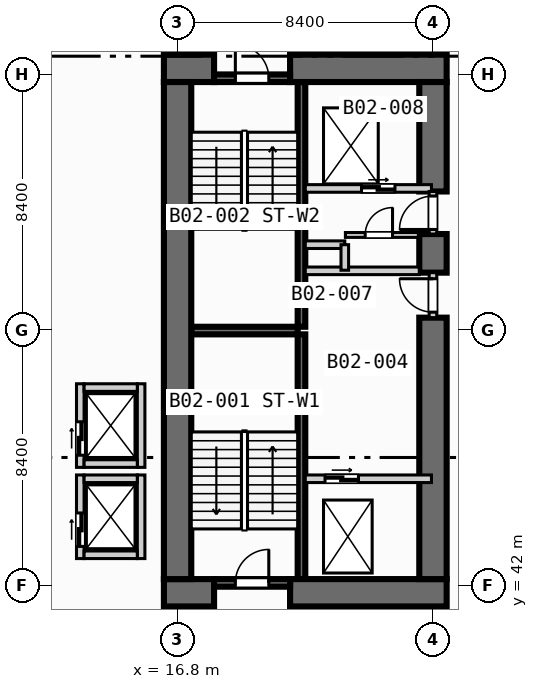
"""IFC4 building model, lengths in metres.
Left out: names, types, materials, properties, quantities, classifications, styles, units other than length and angle.
Written with IfcOpenShell. Run it as: python <this file> out.ifc"""

import sys

from ifc_helpers import new_model, si_unit, direction, frame, frame_2d, origin, place, context, subcontext, project, spatial, rectangle, extrude, element, fill, save


model = new_model("IFC4")
c1 = context("Model", 3, precision=1e-05, world=origin(), true_north=direction((0.0, 1.0)))
c2 = subcontext(c1, "Body", "Model", "MODEL_VIEW")
j1 = project(units=[si_unit("LENGTHUNIT", "METRE"), si_unit("PLANEANGLEUNIT", "RADIAN")], contexts=[c1])
p1 = place(None, origin())
s1 = spatial("IfcSite", under=j1, at=p1, CompositionType="ELEMENT")
p2 = place(p1, origin())
s2 = spatial("IfcBuilding", under=s1, at=p2, CompositionType="ELEMENT")
p3 = place(p2, frame((0.0, 0.0, -8.4)))
s3 = spatial("IfcBuildingStorey", under=s2, at=p3, CompositionType="ELEMENT", Elevation=-8.4)
for number, where, z_axis, x_axis in (
    (1, (20.875, 42.2, 0.0), (0.0, 0.0, 1.0), (0.0, 1.0, 0.0)),
    (2, (20.875, 50.5, 0.0), (0.0, 0.0, 1.0), (0.0, 1.0, 0.0)),
):
    element("IfcWall", number, at=place(p3, frame(where, z_axis=z_axis, x_axis=x_axis)), inside=s3, PredefinedType="SOLIDWALL", context=c2, shape_type="SweptSolid", body=[
        extrude(rectangle(XDim=8.05, YDim=0.25, at=frame_2d((4.025, 0.0))), origin(), (0.0, 0.0, 1.0), 3.85),
    ])
p4 = place(p3, frame((17.25, 50.375, 0.0), z_axis=(0.0, 0.0, 1.0), x_axis=(1.0, 0.0, 0.0)))
e3 = element("IfcWall", 3, at=p4, inside=s3, PredefinedType="SOLIDWALL", context=c2, shape_type="SweptSolid", body=[
    extrude(rectangle(XDim=3.5, YDim=0.25, at=frame_2d((1.75, 0.0))), origin(), (0.0, 0.0, 1.0), 3.85),
])
p5 = place(p3, frame((16.35, 41.75, 0.0), z_axis=(0.0, 0.0, 1.0), x_axis=(1.0, 0.0, 0.0)))
e4 = element("IfcWall", 4, at=p5, inside=s3, PredefinedType="SHEAR", context=c2, shape_type="SweptSolid", body=[
    extrude(rectangle(XDim=1.65, YDim=0.9, at=frame_2d((0.825, 0.0))), origin(), (0.0, 0.0, 1.0), 3.85),
])
p6 = place(p3, frame((20.5, 41.75, 0.0), z_axis=(0.0, 0.0, 1.0), x_axis=(1.0, 0.0, 0.0)))
e5 = element("IfcWall", 5, at=p6, inside=s3, PredefinedType="SHEAR", context=c2, shape_type="SweptSolid", body=[
    extrude(rectangle(XDim=5.15, YDim=0.9, at=frame_2d((2.575, 0.0))), origin(), (0.0, 0.0, 1.0), 3.85),
])
p7 = place(p3, frame((16.35, 59.0, 0.0), z_axis=(0.0, 0.0, 1.0), x_axis=(1.0, 0.0, 0.0)))
e6 = element("IfcWall", 6, at=p7, inside=s3, PredefinedType="SHEAR", context=c2, shape_type="SweptSolid", body=[
    extrude(rectangle(XDim=1.65, YDim=0.9, at=frame_2d((0.825, 0.0))), origin(), (0.0, 0.0, 1.0), 3.85),
])
p8 = place(p3, frame((20.5, 59.0, 0.0), z_axis=(0.0, 0.0, 1.0), x_axis=(1.0, 0.0, 0.0)))
e7 = element("IfcWall", 7, at=p8, inside=s3, PredefinedType="SHEAR", context=c2, shape_type="SweptSolid", body=[
    extrude(rectangle(XDim=5.15, YDim=0.9, at=frame_2d((2.575, 0.0))), origin(), (0.0, 0.0, 1.0), 3.85),
])
p9 = place(p3, frame((16.8, 42.2, 0.0), z_axis=(0.0, 0.0, 1.0), x_axis=(0.0, 1.0, 0.0)))
e8 = element("IfcWall", 8, at=p9, inside=s3, PredefinedType="SHEAR", context=c2, shape_type="SweptSolid", body=[
    extrude(rectangle(XDim=16.35, YDim=0.9, at=frame_2d((8.175, 0.0))), origin(), (0.0, 0.0, 1.0), 3.85),
])
p10 = place(p3, frame((25.2, 42.2, 0.0), z_axis=(0.0, 0.0, 1.0), x_axis=(0.0, 1.0, 0.0)))
e9 = element("IfcWall", 9, at=p10, inside=s3, PredefinedType="SHEAR", context=c2, shape_type="SweptSolid", body=[
    extrude(rectangle(XDim=8.6, YDim=0.9, at=frame_2d((4.3, 0.0))), origin(), (0.0, 0.0, 1.0), 3.85),
])
p11 = place(p3, frame((25.2, 52.28, 0.0), z_axis=(0.0, 0.0, 1.0), x_axis=(0.0, 1.0, 0.0)))
e10 = element("IfcWall", 10, at=p11, inside=s3, PredefinedType="SHEAR", context=c2, shape_type="SweptSolid", body=[
    extrude(rectangle(XDim=1.27, YDim=0.9, at=frame_2d((0.635, 0.0))), origin(), (0.0, 0.0, 1.0), 3.85),
])
p12 = place(p3, frame((25.2, 54.95, 0.0), z_axis=(0.0, 0.0, 1.0), x_axis=(0.0, 1.0, 0.0)))
e11 = element("IfcWall", 11, at=p12, inside=s3, PredefinedType="SHEAR", context=c2, shape_type="SweptSolid", body=[
    extrude(rectangle(XDim=3.6, YDim=0.9, at=frame_2d((1.8, 0.0))), origin(), (0.0, 0.0, 1.0), 3.85),
])
p13 = place(p3, frame((18.0, 42.075, 0.0), z_axis=(0.0, 0.0, 1.0), x_axis=(1.0, 0.0, 0.0)))
e12 = element("IfcWall", 12, at=p13, inside=s3, PredefinedType="SOLIDWALL", context=c2, shape_type="SweptSolid", body=[
    extrude(rectangle(XDim=2.5, YDim=0.25, at=frame_2d((1.25, 0.0))), origin(), (0.0, 0.0, 1.0), 3.85),
])
p14 = place(p13, frame((0.7, 0.0, 0.0)))
e13 = element("IfcOpeningElement", 13, at=p14, cuts=e12, PredefinedType="OPENING", context=c2, shape_type="SweptSolid", body=[
    extrude(rectangle(XDim=1.1, YDim=2.15, at=frame_2d((0.55, 1.075))), frame((0.0, 0.135, 0.0), z_axis=(0.0, -1.0, 0.0), x_axis=(1.0, 0.0, 0.0)), (0.0, 0.0, 1.0), 0.27),
])
p15 = place(p3, frame((18.0, 58.675, 0.0), z_axis=(0.0, 0.0, 1.0), x_axis=(1.0, 0.0, 0.0)))
e14 = element("IfcWall", 14, at=p15, inside=s3, PredefinedType="SOLIDWALL", context=c2, shape_type="SweptSolid", body=[
    extrude(rectangle(XDim=2.5, YDim=0.25, at=frame_2d((1.25, 0.0))), origin(), (0.0, 0.0, 1.0), 3.85),
])
p16 = place(p15, frame((0.7, 0.0, 0.0)))
e15 = element("IfcOpeningElement", 15, at=p16, cuts=e14, PredefinedType="OPENING", context=c2, shape_type="SweptSolid", body=[
    extrude(rectangle(XDim=1.1, YDim=2.15, at=frame_2d((0.55, 1.075))), frame((0.0, 0.135, 0.0), z_axis=(0.0, -1.0, 0.0), x_axis=(1.0, 0.0, 0.0)), (0.0, 0.0, 1.0), 0.27),
])
p17 = place(p3, frame((21.0, 45.5, 0.0), z_axis=(0.0, 0.0, 1.0), x_axis=(1.0, 0.0, 0.0)))
e16 = element("IfcWall", 16, at=p17, inside=s3, PredefinedType="SOLIDWALL", context=c2, shape_type="SweptSolid", body=[
    extrude(rectangle(XDim=4.15, YDim=0.25, at=frame_2d((2.075, 0.0))), origin(), (0.0, 0.0, 1.0), 3.85),
])
p18 = place(p17, frame((0.65, 0.0, 0.0)))
e17 = element("IfcOpeningElement", 17, at=p18, cuts=e16, PredefinedType="OPENING", context=c2, shape_type="SweptSolid", body=[
    extrude(rectangle(XDim=1.1, YDim=2.15, at=frame_2d((0.55, 1.075))), frame((0.0, 0.135, 0.0), z_axis=(0.0, -1.0, 0.0), x_axis=(1.0, 0.0, 0.0)), (0.0, 0.0, 1.0), 0.27),
])
p19 = place(p3, frame((25.2, 50.8, 0.0), z_axis=(0.0, 0.0, 1.0), x_axis=(0.0, 1.0, 0.0)))
e18 = element("IfcWall", 18, at=p19, inside=s3, PredefinedType="SOLIDWALL", context=c2, shape_type="SweptSolid", body=[
    extrude(rectangle(XDim=1.48, YDim=0.25, at=frame_2d((0.74, 0.0))), origin(), (0.0, 0.0, 1.0), 3.85),
])
p20 = place(p19, frame((0.18, 0.0, 0.0)))
e19 = element("IfcOpeningElement", 19, at=p20, cuts=e18, PredefinedType="OPENING", context=c2, shape_type="SweptSolid", body=[
    extrude(rectangle(XDim=1.1, YDim=2.15, at=frame_2d((0.55, 1.075))), frame((0.0, 0.135, 0.0), z_axis=(0.0, -1.0, 0.0), x_axis=(1.0, 0.0, 0.0)), (0.0, 0.0, 1.0), 0.27),
])
p21 = place(p3, frame((21.0, 52.34, 0.0), z_axis=(0.0, 0.0, 1.0), x_axis=(1.0, 0.0, 0.0)))
e20 = element("IfcWall", 20, at=p21, inside=s3, PredefinedType="SOLIDWALL", context=c2, shape_type="SweptSolid", body=[
    extrude(rectangle(XDim=3.75, YDim=0.25, at=frame_2d((1.875, 0.0))), origin(), (0.0, 0.0, 1.0), 3.85),
])
p22 = place(p3, frame((21.0, 55.05, 0.0), z_axis=(0.0, 0.0, 1.0), x_axis=(1.0, 0.0, 0.0)))
e21 = element("IfcWall", 21, at=p22, inside=s3, PredefinedType="SOLIDWALL", context=c2, shape_type="SweptSolid", body=[
    extrude(rectangle(XDim=4.15, YDim=0.25, at=frame_2d((2.075, 0.0))), origin(), (0.0, 0.0, 1.0), 3.85),
])
p23 = place(p22, frame((1.85, 0.0, 0.0)))
e22 = element("IfcOpeningElement", 22, at=p23, cuts=e21, PredefinedType="OPENING", context=c2, shape_type="SweptSolid", body=[
    extrude(rectangle(XDim=1.1, YDim=2.15, at=frame_2d((0.55, 1.075))), frame((0.0, 0.135, 0.0), z_axis=(0.0, -1.0, 0.0), x_axis=(1.0, 0.0, 0.0)), (0.0, 0.0, 1.0), 0.27),
])
p24 = place(p3, frame((25.2, 53.55, 0.0), z_axis=(0.0, 0.0, 1.0), x_axis=(0.0, 1.0, 0.0)))
e23 = element("IfcWall", 23, at=p24, inside=s3, PredefinedType="SOLIDWALL", context=c2, shape_type="SweptSolid", body=[
    extrude(rectangle(XDim=1.4, YDim=0.25, at=frame_2d((0.7, 0.0))), origin(), (0.0, 0.0, 1.0), 3.85),
])
p25 = place(p24, frame((0.15, 0.0, 0.0)))
e24 = element("IfcOpeningElement", 24, at=p25, cuts=e23, PredefinedType="OPENING", context=c2, shape_type="SweptSolid", body=[
    extrude(rectangle(XDim=1.1, YDim=2.15, at=frame_2d((0.55, 1.075))), frame((0.0, 0.135, 0.0), z_axis=(0.0, -1.0, 0.0), x_axis=(1.0, 0.0, 0.0)), (0.0, 0.0, 1.0), 0.27),
])
p26 = place(p3, frame((21.0, 53.2, 0.0), z_axis=(0.0, 0.0, 1.0), x_axis=(1.0, 0.0, 0.0)))
e25 = element("IfcWall", 25, at=p26, inside=s3, PredefinedType="SOLIDWALL", context=c2, shape_type="SweptSolid", body=[
    extrude(rectangle(XDim=1.3, YDim=0.25, at=frame_2d((0.65, 0.0))), origin(), (0.0, 0.0, 1.0), 3.85),
])
p27 = place(p3, frame((22.3, 52.36, 0.0), z_axis=(0.0, 0.0, 1.0), x_axis=(0.0, 1.0, 0.0)))
e26 = element("IfcWall", 26, at=p27, inside=s3, PredefinedType="SOLIDWALL", context=c2, shape_type="SweptSolid", body=[
    extrude(rectangle(XDim=0.84, YDim=0.25, at=frame_2d((0.42, 0.0))), origin(), (0.0, 0.0, 1.0), 3.85),
])
p28 = place(p3, frame((22.32, 53.52, 0.0), z_axis=(0.0, 0.0, 1.0), x_axis=(1.0, 0.0, 0.0)))
e27 = element("IfcWall", 27, at=p28, inside=s3, PredefinedType="PARTITIONING", context=c2, shape_type="SweptSolid", body=[
    extrude(rectangle(XDim=2.4, YDim=0.16, at=frame_2d((1.2, 0.0))), origin(), (0.0, 0.0, 1.0), 3.85),
])
p29 = place(p28, frame((0.65, 0.0, 0.0)))
e28 = element("IfcOpeningElement", 28, at=p29, cuts=e27, PredefinedType="OPENING", context=c2, shape_type="SweptSolid", body=[
    extrude(rectangle(XDim=0.9, YDim=2.1, at=frame_2d((0.45, 1.05))), frame((0.0, 0.09, 0.0), z_axis=(0.0, -1.0, 0.0), x_axis=(1.0, 0.0, 0.0)), (0.0, 0.0, 1.0), 0.18),
])
p30 = place(p3, frame((13.6, 42.875, 0.0), z_axis=(0.0, 0.0, 1.0), x_axis=(0.0, 1.0, 0.0)))
e29 = element("IfcWall", 29, at=p30, inside=s3, PredefinedType="SOLIDWALL", context=c2, shape_type="SweptSolid", body=[
    extrude(rectangle(XDim=2.75, YDim=0.25, at=frame_2d((1.375, 0.0))), origin(), (0.0, 0.0, 1.0), 3.85),
])
p31 = place(p30, frame((0.4, 0.0, 0.0)))
e30 = element("IfcOpeningElement", 30, at=p31, cuts=e29, PredefinedType="OPENING", context=c2, shape_type="SweptSolid", body=[
    extrude(rectangle(XDim=1.1, YDim=2.15, at=frame_2d((0.55, 1.075))), frame((0.0, 0.135, 0.0), z_axis=(0.0, -1.0, 0.0), x_axis=(1.0, 0.0, 0.0)), (0.0, 0.0, 1.0), 0.27),
])
p32 = place(p3, frame((15.6, 42.875, 0.0), z_axis=(0.0, 0.0, 1.0), x_axis=(0.0, 1.0, 0.0)))
e31 = element("IfcWall", 31, at=p32, inside=s3, PredefinedType="SOLIDWALL", context=c2, shape_type="SweptSolid", body=[
    extrude(rectangle(XDim=2.75, YDim=0.25, at=frame_2d((1.375, 0.0))), origin(), (0.0, 0.0, 1.0), 3.85),
])
for number, where, z_axis, x_axis in (
    (32, (13.725, 43.0, 0.0), (0.0, 0.0, 1.0), (1.0, 0.0, 0.0)),
    (33, (13.725, 45.5, 0.0), (0.0, 0.0, 1.0), (1.0, 0.0, 0.0)),
):
    element("IfcWall", number, at=place(p3, frame(where, z_axis=z_axis, x_axis=x_axis)), inside=s3, PredefinedType="SOLIDWALL", context=c2, shape_type="SweptSolid", body=[
        extrude(rectangle(XDim=1.75, YDim=0.25, at=frame_2d((0.875, 0.0))), origin(), (0.0, 0.0, 1.0), 3.85),
    ])
p33 = place(p3, frame((13.6, 45.875, 0.0), z_axis=(0.0, 0.0, 1.0), x_axis=(0.0, 1.0, 0.0)))
e34 = element("IfcWall", 34, at=p33, inside=s3, PredefinedType="SOLIDWALL", context=c2, shape_type="SweptSolid", body=[
    extrude(rectangle(XDim=2.75, YDim=0.25, at=frame_2d((1.375, 0.0))), origin(), (0.0, 0.0, 1.0), 3.85),
])
p34 = place(p33, frame((0.4, 0.0, 0.0)))
e35 = element("IfcOpeningElement", 35, at=p34, cuts=e34, PredefinedType="OPENING", context=c2, shape_type="SweptSolid", body=[
    extrude(rectangle(XDim=1.1, YDim=2.15, at=frame_2d((0.55, 1.075))), frame((0.0, 0.135, 0.0), z_axis=(0.0, -1.0, 0.0), x_axis=(1.0, 0.0, 0.0)), (0.0, 0.0, 1.0), 0.27),
])
p35 = place(p3, frame((15.6, 45.875, 0.0), z_axis=(0.0, 0.0, 1.0), x_axis=(0.0, 1.0, 0.0)))
e36 = element("IfcWall", 36, at=p35, inside=s3, PredefinedType="SOLIDWALL", context=c2, shape_type="SweptSolid", body=[
    extrude(rectangle(XDim=2.75, YDim=0.25, at=frame_2d((1.375, 0.0))), origin(), (0.0, 0.0, 1.0), 3.85),
])
for number, where, z_axis, x_axis in (
    (37, (13.725, 46.0, 0.0), (0.0, 0.0, 1.0), (1.0, 0.0, 0.0)),
    (38, (13.725, 48.5, 0.0), (0.0, 0.0, 1.0), (1.0, 0.0, 0.0)),
):
    element("IfcWall", number, at=place(p3, frame(where, z_axis=z_axis, x_axis=x_axis)), inside=s3, PredefinedType="SOLIDWALL", context=c2, shape_type="SweptSolid", body=[
        extrude(rectangle(XDim=1.75, YDim=0.25, at=frame_2d((0.875, 0.0))), origin(), (0.0, 0.0, 1.0), 3.85),
    ])
p36 = place(p14, origin())
e39 = element("IfcDoor", 39, at=p36, inside=s3, OperationType="SINGLE_SWING_RIGHT", PredefinedType="DOOR", context=c2, shape_type="SweptSolid", body=[
    extrude(rectangle(XDim=1.1, YDim=2.15, at=frame_2d((0.55, 1.075))), frame((0.0, 0.025, 0.0), z_axis=(0.0, -1.0, 0.0), x_axis=(1.0, 0.0, 0.0)), (0.0, 0.0, 1.0), 0.05),
])
fill(e13, e39)
p37 = place(p16, origin())
e40 = element("IfcDoor", 40, at=p37, inside=s3, OperationType="SINGLE_SWING_LEFT", PredefinedType="DOOR", context=c2, shape_type="SweptSolid", body=[
    extrude(rectangle(XDim=1.1, YDim=2.15, at=frame_2d((0.55, 1.075))), frame((0.0, 0.025, 0.0), z_axis=(0.0, -1.0, 0.0), x_axis=(1.0, 0.0, 0.0)), (0.0, 0.0, 1.0), 0.05),
])
fill(e15, e40)
p38 = place(p18, origin())
e41 = element("IfcDoor", 41, at=p38, inside=s3, OperationType="SLIDING_TO_LEFT", PredefinedType="DOOR", context=c2, shape_type="SweptSolid", body=[
    extrude(rectangle(XDim=1.1, YDim=2.15, at=frame_2d((0.55, 1.075))), frame((0.0, 0.025, 0.0), z_axis=(0.0, -1.0, 0.0), x_axis=(1.0, 0.0, 0.0)), (0.0, 0.0, 1.0), 0.05),
])
fill(e17, e41)
p39 = place(p20, origin())
e42 = element("IfcDoor", 42, at=p39, inside=s3, OperationType="SINGLE_SWING_RIGHT", PredefinedType="DOOR", context=c2, shape_type="SweptSolid", body=[
    extrude(rectangle(XDim=1.1, YDim=2.15, at=frame_2d((0.55, 1.075))), frame((0.0, 0.025, 0.0), z_axis=(0.0, -1.0, 0.0), x_axis=(1.0, 0.0, 0.0)), (0.0, 0.0, 1.0), 0.05),
])
fill(e19, e42)
p40 = place(p23, origin())
e43 = element("IfcDoor", 43, at=p40, inside=s3, OperationType="SLIDING_TO_LEFT", PredefinedType="DOOR", context=c2, shape_type="SweptSolid", body=[
    extrude(rectangle(XDim=1.1, YDim=2.15, at=frame_2d((0.55, 1.075))), frame((0.0, 0.025, 0.0), z_axis=(0.0, -1.0, 0.0), x_axis=(1.0, 0.0, 0.0)), (0.0, 0.0, 1.0), 0.05),
])
fill(e22, e43)
p41 = place(p25, origin())
e44 = element("IfcDoor", 44, at=p41, inside=s3, OperationType="SINGLE_SWING_LEFT", PredefinedType="DOOR", context=c2, shape_type="SweptSolid", body=[
    extrude(rectangle(XDim=1.1, YDim=2.15, at=frame_2d((0.55, 1.075))), frame((0.0, 0.025, 0.0), z_axis=(0.0, -1.0, 0.0), x_axis=(1.0, 0.0, 0.0)), (0.0, 0.0, 1.0), 0.05),
])
fill(e24, e44)
p42 = place(p29, origin())
e45 = element("IfcDoor", 45, at=p42, inside=s3, OperationType="SINGLE_SWING_RIGHT", PredefinedType="DOOR", context=c2, shape_type="SweptSolid", body=[
    extrude(rectangle(XDim=0.9, YDim=2.1, at=frame_2d((0.45, 1.05))), frame((0.0, 0.025, 0.0), z_axis=(0.0, -1.0, 0.0), x_axis=(1.0, 0.0, 0.0)), (0.0, 0.0, 1.0), 0.05),
])
fill(e28, e45)
p43 = place(p31, origin())
e46 = element("IfcDoor", 46, at=p43, inside=s3, OperationType="SLIDING_TO_LEFT", PredefinedType="DOOR", context=c2, shape_type="SweptSolid", body=[
    extrude(rectangle(XDim=1.1, YDim=2.15, at=frame_2d((0.55, 1.075))), frame((0.0, 0.025, 0.0), z_axis=(0.0, -1.0, 0.0), x_axis=(1.0, 0.0, 0.0)), (0.0, 0.0, 1.0), 0.05),
])
fill(e30, e46)
p44 = place(p34, origin())
e47 = element("IfcDoor", 47, at=p44, inside=s3, OperationType="SLIDING_TO_LEFT", PredefinedType="DOOR", context=c2, shape_type="SweptSolid", body=[
    extrude(rectangle(XDim=1.1, YDim=2.15, at=frame_2d((0.55, 1.075))), frame((0.0, 0.025, 0.0), z_axis=(0.0, -1.0, 0.0), x_axis=(1.0, 0.0, 0.0)), (0.0, 0.0, 1.0), 0.05),
])
fill(e35, e47)
save(model, sys.argv[1])
